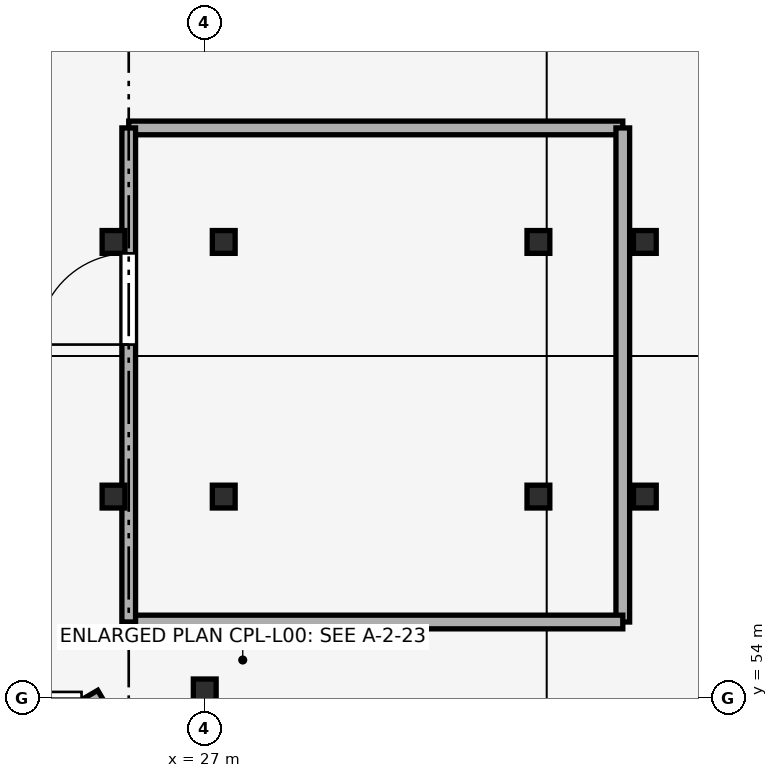
"""IFC4 building model, lengths in metres.
Left out: names, types, materials, properties, quantities, classifications, styles, units other than length and angle.
Written with IfcOpenShell. Run it as: python <this file> out.ifc"""

import sys

from ifc_helpers import new_model, si_unit, direction, frame, frame_2d, origin, origin_2d, place, context, subcontext, project, spatial, rectangle, hollow_rectangle, i_section, extrude, element, fill, save


model = new_model("IFC4")
c1 = context("Model", 3, precision=1e-05, world=origin(), true_north=direction((0.0, 1.0)))
c2 = subcontext(c1, "Body", "Model", "MODEL_VIEW")
j1 = project(units=[si_unit("LENGTHUNIT", "METRE"), si_unit("PLANEANGLEUNIT", "RADIAN")], contexts=[c1])
p1 = place(None, origin())
s1 = spatial("IfcSite", under=j1, at=p1, CompositionType="ELEMENT")
p2 = place(p1, origin())
s2 = spatial("IfcBuilding", under=s1, at=p2, CompositionType="ELEMENT")
p3 = place(p2, origin())
s3 = spatial("IfcBuildingStorey", under=s2, at=p3, CompositionType="ELEMENT", Elevation=0.0)
p4 = place(p3, frame((27.0, 54.0, 0.0), z_axis=(0.0, 0.0, 1.0), x_axis=(1.0, 0.0, 0.0)))
e1 = element("IfcColumn", 1, at=p4, inside=s3, PredefinedType="COLUMN", context=c2, shape_type="SweptSolid", body=[
    extrude(i_section(OverallWidth=0.3, OverallDepth=0.5, WebThickness=0.014, FlangeThickness=0.028, FilletRadius=0.027, at=origin_2d()), origin(), (0.0, 0.0, 1.0), 5.4),
])
p5 = place(p3, frame((27.0, 51.3, 0.0), z_axis=(0.0, 0.0, 1.0), x_axis=(-0.505112575753, 0.863053466372, 0.0)))
e2 = element("IfcWall", 2, at=p5, inside=s3, PredefinedType="STANDARD", context=c2, shape_type="SweptSolid", body=[
    extrude(rectangle(XDim=3.129, YDim=0.4, at=frame_2d((1.564, 0.0))), origin(), (0.0, 0.0, 1.0), 5.12),
])
for number, where, z_axis, x_axis in (
    (3, (25.8, 56.65, 0.0), (0.0, 0.0, 1.0), (1.0, 0.0, 0.0)),
    (4, (25.8, 60.0, 0.0), (0.0, 0.0, 1.0), (1.0, 0.0, 0.0)),
    (5, (27.25, 56.65, 0.0), (0.0, 0.0, 1.0), (1.0, 0.0, 0.0)),
    (6, (27.25, 60.0, 0.0), (0.0, 0.0, 1.0), (1.0, 0.0, 0.0)),
    (7, (31.39, 56.65, 0.0), (0.0, 0.0, 1.0), (1.0, 0.0, 0.0)),
    (8, (31.39, 60.0, 0.0), (0.0, 0.0, 1.0), (1.0, 0.0, 0.0)),
    (9, (32.79, 56.65, 0.0), (0.0, 0.0, 1.0), (1.0, 0.0, 0.0)),
    (10, (32.79, 60.0, 0.0), (0.0, 0.0, 1.0), (1.0, 0.0, 0.0)),
):
    element("IfcColumn", number, at=place(p3, frame(where, z_axis=z_axis, x_axis=x_axis)), inside=s3, PredefinedType="COLUMN", context=c2, shape_type="SweptSolid", body=[
        extrude(hollow_rectangle(XDim=0.3, YDim=0.3, WallThickness=0.012, at=origin_2d()), origin(), (0.0, 0.0, 1.0), 5.4),
    ])
for number, where, z_axis, x_axis in (
    (11, (26.0, 61.5, 0.0), (0.0, 0.0, 1.0), (1.0, 0.0, 0.0)),
    (12, (32.5, 61.5, 0.0), (0.0, 0.0, 1.0), (0.0, -1.0, 0.0)),
    (13, (32.5, 55.0, 0.0), (0.0, 0.0, 1.0), (-1.0, 0.0, 0.0)),
):
    element("IfcWall", number, at=place(p3, frame(where, z_axis=z_axis, x_axis=x_axis)), inside=s3, PredefinedType="PARTITIONING", context=c2, shape_type="SweptSolid", body=[
        extrude(rectangle(XDim=6.5, YDim=0.18, at=frame_2d((3.25, 0.0))), origin(), (0.0, 0.0, 1.0), 5.12),
    ])
p6 = place(p3, frame((26.0, 55.0, 0.0), z_axis=(0.0, 0.0, 1.0), x_axis=(0.0, 1.0, 0.0)))
e14 = element("IfcWall", 14, at=p6, inside=s3, PredefinedType="PARTITIONING", context=c2, shape_type="SweptSolid", body=[
    extrude(rectangle(XDim=6.5, YDim=0.18, at=frame_2d((3.25, 0.0))), origin(), (0.0, 0.0, 1.0), 5.12),
])
p7 = place(p6, frame((3.65, 0.0, 0.0)))
e15 = element("IfcOpeningElement", 15, at=p7, cuts=e14, PredefinedType="OPENING", context=c2, shape_type="SweptSolid", body=[
    extrude(rectangle(XDim=1.2, YDim=2.15, at=frame_2d((0.6, 1.075))), frame((0.0, 0.1, 0.0), z_axis=(0.0, -1.0, 0.0), x_axis=(1.0, 0.0, 0.0)), (0.0, 0.0, 1.0), 0.2),
])
p8 = place(p7, origin())
e16 = element("IfcDoor", 16, at=p8, inside=s3, OperationType="SINGLE_SWING_LEFT", PredefinedType="DOOR", context=c2, shape_type="SweptSolid", body=[
    extrude(rectangle(XDim=1.2, YDim=2.15, at=frame_2d((0.6, 1.075))), frame((0.0, 0.025, 0.0), z_axis=(0.0, -1.0, 0.0), x_axis=(1.0, 0.0, 0.0)), (0.0, 0.0, 1.0), 0.05),
])
fill(e15, e16)
save(model, sys.argv[1])
